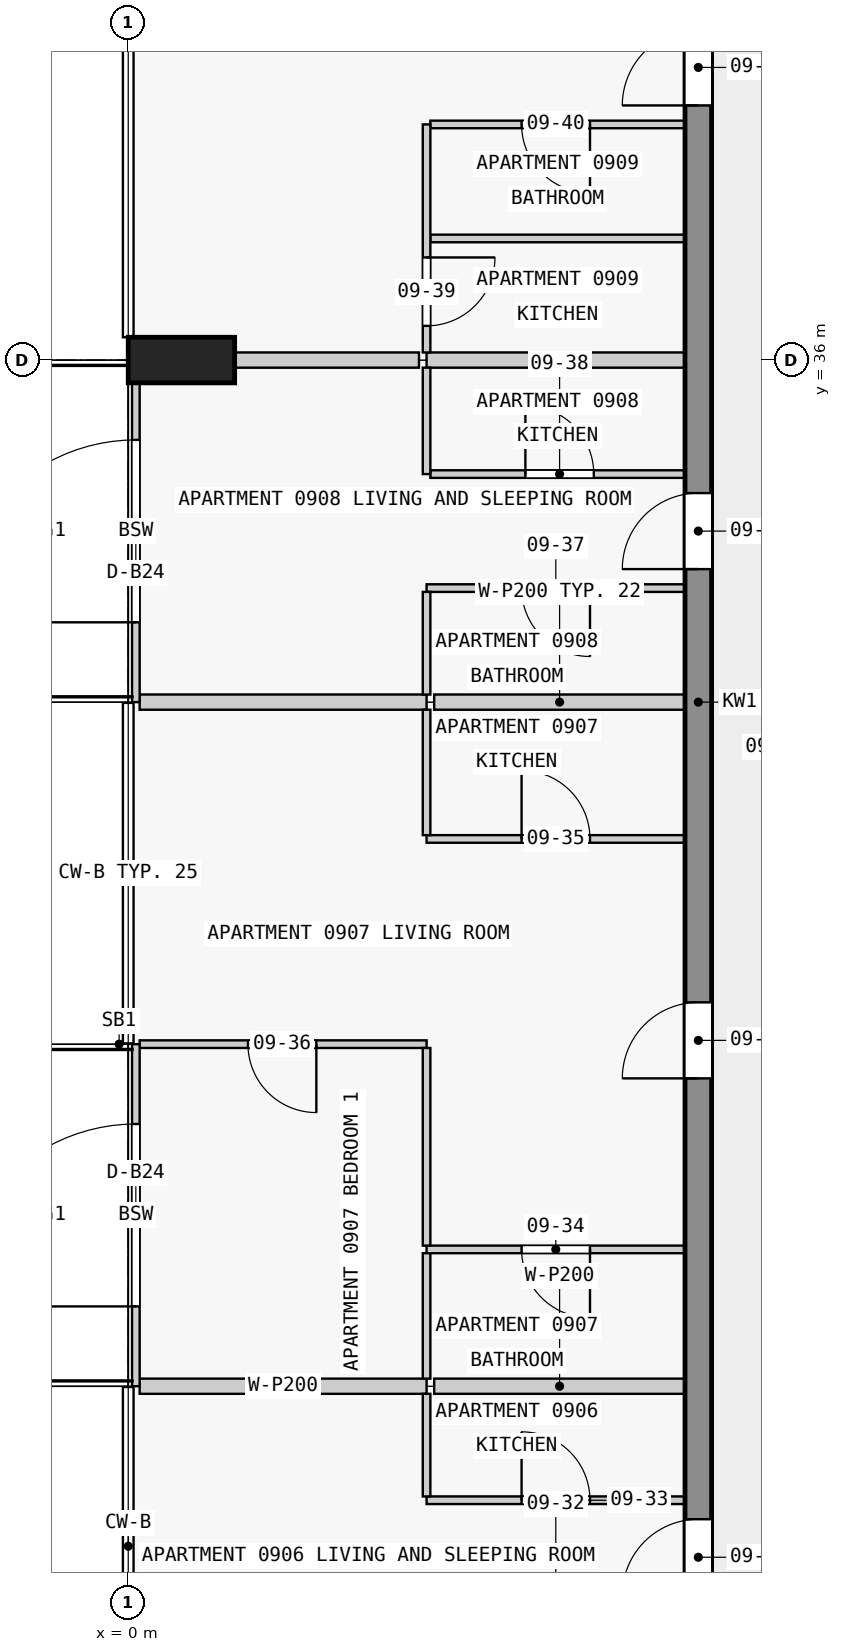
"""IFC4 building model, lengths in metres.
Left out: names, types, materials, properties, quantities, classifications, styles, units other than length and angle.
Written with IfcOpenShell. Run it as: python <this file> out.ifc"""

import sys

from ifc_helpers import new_model, si_unit, direction, frame, frame_2d, origin, origin_2d, place, context, subcontext, project, spatial, rectangle, extrude, element, fill, save


model = new_model("IFC4")
c1 = context("Model", 3, precision=1e-05, world=origin(), true_north=direction((0.0, 1.0)))
c2 = subcontext(c1, "Body", "Model", "MODEL_VIEW")
j1 = project(units=[si_unit("LENGTHUNIT", "METRE"), si_unit("PLANEANGLEUNIT", "RADIAN")], contexts=[c1])
p1 = place(None, origin())
s1 = spatial("IfcSite", under=j1, at=p1, CompositionType="ELEMENT")
p2 = place(p1, origin())
s2 = spatial("IfcBuilding", under=s1, at=p2, CompositionType="ELEMENT")
p3 = place(p2, frame((0.0, 0.0, 40.8)))
s3 = spatial("IfcBuildingStorey", under=s2, at=p3, CompositionType="ELEMENT", Elevation=40.8)
p4 = place(p3, frame((0.7, 36.0, 0.0), z_axis=(0.0, 0.0, 1.0), x_axis=(0.0, 1.0, 0.0)))
e1 = element("IfcColumn", 1, at=p4, inside=s3, PredefinedType="COLUMN", context=c2, shape_type="SweptSolid", body=[
    extrude(rectangle(XDim=0.6, YDim=1.4, at=origin_2d()), origin(), (0.0, 0.0, 1.0), 3.5),
])
p5 = place(p3, frame((7.5, 18.0, 0.0), z_axis=(0.0, 0.0, 1.0), x_axis=(0.0, 1.0, 0.0)))
e2 = element("IfcWall", 2, at=p5, inside=s3, PredefinedType="SHEAR", context=c2, shape_type="SweptSolid", body=[
    extrude(rectangle(XDim=27.0, YDim=0.35, at=frame_2d((13.5, 0.0))), origin(), (0.0, 0.0, 1.0), 3.25),
])
p6 = place(p5, frame((1.75, 0.0, 0.0)))
e3 = element("IfcOpeningElement", 3, at=p6, cuts=e2, PredefinedType="OPENING", context=c2, shape_type="SweptSolid", body=[
    extrude(rectangle(XDim=1.0, YDim=2.1, at=frame_2d((0.5, 1.05))), frame((0.0, 0.185, 0.0), z_axis=(0.0, -1.0, 0.0), x_axis=(1.0, 0.0, 0.0)), (0.0, 0.0, 1.0), 0.37),
])
p7 = place(p5, frame((8.55, 0.0, 0.0)))
e4 = element("IfcOpeningElement", 4, at=p7, cuts=e2, PredefinedType="OPENING", context=c2, shape_type="SweptSolid", body=[
    extrude(rectangle(XDim=1.0, YDim=2.1, at=frame_2d((0.5, 1.05))), frame((0.0, 0.185, 0.0), z_axis=(0.0, -1.0, 0.0), x_axis=(1.0, 0.0, 0.0)), (0.0, 0.0, 1.0), 0.37),
])
p8 = place(p5, frame((15.25, 0.0, 0.0)))
e5 = element("IfcOpeningElement", 5, at=p8, cuts=e2, PredefinedType="OPENING", context=c2, shape_type="SweptSolid", body=[
    extrude(rectangle(XDim=1.0, YDim=2.1, at=frame_2d((0.5, 1.05))), frame((0.0, 0.185, 0.0), z_axis=(0.0, -1.0, 0.0), x_axis=(1.0, 0.0, 0.0)), (0.0, 0.0, 1.0), 0.37),
])
p9 = place(p5, frame((21.35, 0.0, 0.0)))
e6 = element("IfcOpeningElement", 6, at=p9, cuts=e2, PredefinedType="OPENING", context=c2, shape_type="SweptSolid", body=[
    extrude(rectangle(XDim=1.0, YDim=2.1, at=frame_2d((0.5, 1.05))), frame((0.0, 0.185, 0.0), z_axis=(0.0, -1.0, 0.0), x_axis=(1.0, 0.0, 0.0)), (0.0, 0.0, 1.0), 0.37),
])
p10 = place(p3, frame((0.1, 22.5, 0.0), z_axis=(0.0, 0.0, 1.0), x_axis=(0.0, 1.0, 0.0)))
e7 = element("IfcWall", 7, at=p10, inside=s3, PredefinedType="STANDARD", context=c2, shape_type="SweptSolid", body=[
    extrude(rectangle(XDim=4.5, YDim=0.1, at=frame_2d((2.25, 0.0))), origin(), (0.0, 0.0, 1.0), 3.25),
])
p11 = place(p10, frame((1.05, 0.0, 0.0)))
e8 = element("IfcOpeningElement", 8, at=p11, cuts=e7, PredefinedType="OPENING", context=c2, shape_type="SweptSolid", body=[
    extrude(rectangle(XDim=2.4, YDim=2.4, at=frame_2d((1.2, 1.2))), frame((0.0, 0.06, 0.0), z_axis=(0.0, -1.0, 0.0), x_axis=(1.0, 0.0, 0.0)), (0.0, 0.0, 1.0), 0.12),
])
p12 = place(p3, frame((0.1, 31.5, 0.0), z_axis=(0.0, 0.0, 1.0), x_axis=(0.0, 1.0, 0.0)))
e9 = element("IfcWall", 9, at=p12, inside=s3, PredefinedType="STANDARD", context=c2, shape_type="SweptSolid", body=[
    extrude(rectangle(XDim=4.5, YDim=0.1, at=frame_2d((2.25, 0.0))), origin(), (0.0, 0.0, 1.0), 3.25),
])
p13 = place(p12, frame((1.05, 0.0, 0.0)))
e10 = element("IfcOpeningElement", 10, at=p13, cuts=e9, PredefinedType="OPENING", context=c2, shape_type="SweptSolid", body=[
    extrude(rectangle(XDim=2.4, YDim=2.4, at=frame_2d((1.2, 1.2))), frame((0.0, 0.06, 0.0), z_axis=(0.0, -1.0, 0.0), x_axis=(1.0, 0.0, 0.0)), (0.0, 0.0, 1.0), 0.12),
])
p14 = place(p3, frame((3.925, 21.0, 0.0), z_axis=(0.0, 0.0, 1.0), x_axis=(1.0, 0.0, 0.0)))
e11 = element("IfcWall", 11, at=p14, inside=s3, PredefinedType="PARTITIONING", context=c2, shape_type="SweptSolid", body=[
    extrude(rectangle(XDim=3.4, YDim=0.1, at=frame_2d((1.7, 0.0))), origin(), (0.0, 0.0, 1.0), 3.25),
])
p15 = place(p14, frame((1.25, 0.0, 0.0)))
e12 = element("IfcOpeningElement", 12, at=p15, cuts=e11, PredefinedType="OPENING", context=c2, shape_type="SweptSolid", body=[
    extrude(rectangle(XDim=0.9, YDim=2.1, at=frame_2d((0.45, 1.05))), frame((0.0, 0.06, 0.0), z_axis=(0.0, -1.0, 0.0), x_axis=(1.0, 0.0, 0.0)), (0.0, 0.0, 1.0), 0.12),
])
p16 = place(p3, frame((7.325, 22.5, 0.0), z_axis=(0.0, 0.0, 1.0), x_axis=(-1.0, 0.0, 0.0)))
e13 = element("IfcWall", 13, at=p16, inside=s3, PredefinedType="PARTITIONING", context=c2, shape_type="SweptSolid", body=[
    extrude(rectangle(XDim=3.3, YDim=0.2, at=frame_2d((1.65, 0.0))), origin(), (0.0, 0.0, 1.0), 3.25),
])
p17 = place(p3, frame((0.15, 22.5, 0.0), z_axis=(0.0, 0.0, 1.0), x_axis=(1.0, 0.0, 0.0)))
e14 = element("IfcWall", 14, at=p17, inside=s3, PredefinedType="PARTITIONING", context=c2, shape_type="SweptSolid", body=[
    extrude(rectangle(XDim=3.775, YDim=0.2, at=frame_2d((1.888, 0.0))), origin(), (0.0, 0.0, 1.0), 3.25),
])
p18 = place(p3, frame((7.325, 24.3, 0.0), z_axis=(0.0, 0.0, 1.0), x_axis=(-1.0, 0.0, 0.0)))
e15 = element("IfcWall", 15, at=p18, inside=s3, PredefinedType="PARTITIONING", context=c2, shape_type="SweptSolid", body=[
    extrude(rectangle(XDim=3.4, YDim=0.1, at=frame_2d((1.7, 0.0))), origin(), (0.0, 0.0, 1.0), 3.25),
])
p19 = place(p18, frame((1.25, 0.0, 0.0)))
e16 = element("IfcOpeningElement", 16, at=p19, cuts=e15, PredefinedType="OPENING", context=c2, shape_type="SweptSolid", body=[
    extrude(rectangle(XDim=0.9, YDim=2.1, at=frame_2d((0.45, 1.05))), frame((0.0, 0.06, 0.0), z_axis=(0.0, -1.0, 0.0), x_axis=(1.0, 0.0, 0.0)), (0.0, 0.0, 1.0), 0.12),
])
p20 = place(p3, frame((3.925, 27.0, 0.0), z_axis=(0.0, 0.0, 1.0), x_axis=(-1.0, 0.0, 0.0)))
e17 = element("IfcWall", 17, at=p20, inside=s3, PredefinedType="PARTITIONING", context=c2, shape_type="SweptSolid", body=[
    extrude(rectangle(XDim=3.775, YDim=0.1, at=frame_2d((1.888, 0.0))), origin(), (0.0, 0.0, 1.0), 3.25),
])
p21 = place(p20, frame((1.45, 0.0, 0.0)))
e18 = element("IfcOpeningElement", 18, at=p21, cuts=e17, PredefinedType="OPENING", context=c2, shape_type="SweptSolid", body=[
    extrude(rectangle(XDim=0.9, YDim=2.1, at=frame_2d((0.45, 1.05))), frame((0.0, 0.06, 0.0), z_axis=(0.0, -1.0, 0.0), x_axis=(1.0, 0.0, 0.0)), (0.0, 0.0, 1.0), 0.12),
])
p22 = place(p3, frame((3.925, 29.7, 0.0), z_axis=(0.0, 0.0, 1.0), x_axis=(1.0, 0.0, 0.0)))
e19 = element("IfcWall", 19, at=p22, inside=s3, PredefinedType="PARTITIONING", context=c2, shape_type="SweptSolid", body=[
    extrude(rectangle(XDim=3.4, YDim=0.1, at=frame_2d((1.7, 0.0))), origin(), (0.0, 0.0, 1.0), 3.25),
])
p23 = place(p22, frame((1.25, 0.0, 0.0)))
e20 = element("IfcOpeningElement", 20, at=p23, cuts=e19, PredefinedType="OPENING", context=c2, shape_type="SweptSolid", body=[
    extrude(rectangle(XDim=0.9, YDim=2.1, at=frame_2d((0.45, 1.05))), frame((0.0, 0.06, 0.0), z_axis=(0.0, -1.0, 0.0), x_axis=(1.0, 0.0, 0.0)), (0.0, 0.0, 1.0), 0.12),
])
p24 = place(p3, frame((7.325, 31.5, 0.0), z_axis=(0.0, 0.0, 1.0), x_axis=(-1.0, 0.0, 0.0)))
e21 = element("IfcWall", 21, at=p24, inside=s3, PredefinedType="PARTITIONING", context=c2, shape_type="SweptSolid", body=[
    extrude(rectangle(XDim=3.3, YDim=0.2, at=frame_2d((1.65, 0.0))), origin(), (0.0, 0.0, 1.0), 3.25),
])
p25 = place(p3, frame((0.15, 31.5, 0.0), z_axis=(0.0, 0.0, 1.0), x_axis=(1.0, 0.0, 0.0)))
e22 = element("IfcWall", 22, at=p25, inside=s3, PredefinedType="PARTITIONING", context=c2, shape_type="SweptSolid", body=[
    extrude(rectangle(XDim=3.775, YDim=0.2, at=frame_2d((1.888, 0.0))), origin(), (0.0, 0.0, 1.0), 3.25),
])
p26 = place(p3, frame((7.325, 33.0, 0.0), z_axis=(0.0, 0.0, 1.0), x_axis=(-1.0, 0.0, 0.0)))
e23 = element("IfcWall", 23, at=p26, inside=s3, PredefinedType="PARTITIONING", context=c2, shape_type="SweptSolid", body=[
    extrude(rectangle(XDim=3.4, YDim=0.1, at=frame_2d((1.7, 0.0))), origin(), (0.0, 0.0, 1.0), 3.25),
])
p27 = place(p26, frame((1.25, 0.0, 0.0)))
e24 = element("IfcOpeningElement", 24, at=p27, cuts=e23, PredefinedType="OPENING", context=c2, shape_type="SweptSolid", body=[
    extrude(rectangle(XDim=0.9, YDim=2.1, at=frame_2d((0.45, 1.05))), frame((0.0, 0.06, 0.0), z_axis=(0.0, -1.0, 0.0), x_axis=(1.0, 0.0, 0.0)), (0.0, 0.0, 1.0), 0.12),
])
p28 = place(p3, frame((3.975, 34.5, 0.0), z_axis=(0.0, 0.0, 1.0), x_axis=(1.0, 0.0, 0.0)))
e25 = element("IfcWall", 25, at=p28, inside=s3, PredefinedType="PARTITIONING", context=c2, shape_type="SweptSolid", body=[
    extrude(rectangle(XDim=3.35, YDim=0.1, at=frame_2d((1.675, 0.0))), origin(), (0.0, 0.0, 1.0), 3.25),
])
p29 = place(p28, frame((1.25, 0.0, 0.0)))
e26 = element("IfcOpeningElement", 26, at=p29, cuts=e25, PredefinedType="OPENING", context=c2, shape_type="SweptSolid", body=[
    extrude(rectangle(XDim=0.9, YDim=2.1, at=frame_2d((0.45, 1.05))), frame((0.0, 0.06, 0.0), z_axis=(0.0, -1.0, 0.0), x_axis=(1.0, 0.0, 0.0)), (0.0, 0.0, 1.0), 0.12),
])
p30 = place(p3, frame((7.325, 36.0, 0.0), z_axis=(0.0, 0.0, 1.0), x_axis=(-1.0, 0.0, 0.0)))
e27 = element("IfcWall", 27, at=p30, inside=s3, PredefinedType="PARTITIONING", context=c2, shape_type="SweptSolid", body=[
    extrude(rectangle(XDim=3.4, YDim=0.2, at=frame_2d((1.7, 0.0))), origin(), (0.0, 0.0, 1.0), 3.25),
])
p31 = place(p3, frame((1.4, 36.0, 0.0), z_axis=(0.0, 0.0, 1.0), x_axis=(1.0, 0.0, 0.0)))
e28 = element("IfcWall", 28, at=p31, inside=s3, PredefinedType="PARTITIONING", context=c2, shape_type="SweptSolid", body=[
    extrude(rectangle(XDim=2.425, YDim=0.2, at=frame_2d((1.212, 0.0))), origin(), (0.0, 0.0, 1.0), 3.25),
])
p32 = place(p3, frame((7.325, 37.6, 0.0), z_axis=(0.0, 0.0, 1.0), x_axis=(-1.0, 0.0, 0.0)))
e29 = element("IfcWall", 29, at=p32, inside=s3, PredefinedType="PARTITIONING", context=c2, shape_type="SweptSolid", body=[
    extrude(rectangle(XDim=3.35, YDim=0.1, at=frame_2d((1.675, 0.0))), origin(), (0.0, 0.0, 1.0), 3.25),
])
p33 = place(p3, frame((7.325, 39.1, 0.0), z_axis=(0.0, 0.0, 1.0), x_axis=(-1.0, 0.0, 0.0)))
e30 = element("IfcWall", 30, at=p33, inside=s3, PredefinedType="PARTITIONING", context=c2, shape_type="SweptSolid", body=[
    extrude(rectangle(XDim=3.35, YDim=0.1, at=frame_2d((1.675, 0.0))), origin(), (0.0, 0.0, 1.0), 3.25),
])
p34 = place(p33, frame((1.25, 0.0, 0.0)))
e31 = element("IfcOpeningElement", 31, at=p34, cuts=e30, PredefinedType="OPENING", context=c2, shape_type="SweptSolid", body=[
    extrude(rectangle(XDim=0.9, YDim=2.1, at=frame_2d((0.45, 1.05))), frame((0.0, 0.06, 0.0), z_axis=(0.0, -1.0, 0.0), x_axis=(1.0, 0.0, 0.0)), (0.0, 0.0, 1.0), 0.12),
])
p35 = place(p3, frame((3.925, 22.4, 0.0), z_axis=(0.0, 0.0, 1.0), x_axis=(0.0, -1.0, 0.0)))
e32 = element("IfcWall", 32, at=p35, inside=s3, PredefinedType="PARTITIONING", context=c2, shape_type="SweptSolid", body=[
    extrude(rectangle(XDim=1.35, YDim=0.1, at=frame_2d((0.675, 0.0))), origin(), (0.0, 0.0, 1.0), 3.25),
])
for number, where, z_axis, x_axis in (
    (33, (3.925, 24.25, 0.0), (0.0, 0.0, 1.0), (0.0, -1.0, 0.0)),
    (34, (3.925, 31.4, 0.0), (0.0, 0.0, 1.0), (0.0, -1.0, 0.0)),
):
    element("IfcWall", number, at=place(p3, frame(where, z_axis=z_axis, x_axis=x_axis)), inside=s3, PredefinedType="PARTITIONING", context=c2, shape_type="SweptSolid", body=[
        extrude(rectangle(XDim=1.65, YDim=0.1, at=frame_2d((0.825, 0.0))), origin(), (0.0, 0.0, 1.0), 3.25),
    ])
p36 = place(p3, frame((3.925, 32.95, 0.0), z_axis=(0.0, 0.0, 1.0), x_axis=(0.0, -1.0, 0.0)))
e35 = element("IfcWall", 35, at=p36, inside=s3, PredefinedType="PARTITIONING", context=c2, shape_type="SweptSolid", body=[
    extrude(rectangle(XDim=1.35, YDim=0.1, at=frame_2d((0.675, 0.0))), origin(), (0.0, 0.0, 1.0), 3.25),
])
p37 = place(p3, frame((3.925, 35.9, 0.0), z_axis=(0.0, 0.0, 1.0), x_axis=(0.0, -1.0, 0.0)))
e36 = element("IfcWall", 36, at=p37, inside=s3, PredefinedType="PARTITIONING", context=c2, shape_type="SweptSolid", body=[
    extrude(rectangle(XDim=1.4, YDim=0.1, at=frame_2d((0.7, 0.0))), origin(), (0.0, 0.0, 1.0), 3.25),
])
p38 = place(p3, frame((3.925, 39.1, 0.0), z_axis=(0.0, 0.0, 1.0), x_axis=(0.0, -1.0, 0.0)))
e37 = element("IfcWall", 37, at=p38, inside=s3, PredefinedType="PARTITIONING", context=c2, shape_type="SweptSolid", body=[
    extrude(rectangle(XDim=3.0, YDim=0.1, at=frame_2d((1.5, 0.0))), origin(), (0.0, 0.0, 1.0), 3.25),
])
p39 = place(p38, frame((1.75, 0.0, 0.0)))
e38 = element("IfcOpeningElement", 38, at=p39, cuts=e37, PredefinedType="OPENING", context=c2, shape_type="SweptSolid", body=[
    extrude(rectangle(XDim=0.9, YDim=2.1, at=frame_2d((0.45, 1.05))), frame((0.0, 0.06, 0.0), z_axis=(0.0, -1.0, 0.0), x_axis=(1.0, 0.0, 0.0)), (0.0, 0.0, 1.0), 0.12),
])
p40 = place(p3, frame((3.925, 24.35, 0.0), z_axis=(0.0, 0.0, 1.0), x_axis=(0.0, 1.0, 0.0)))
e39 = element("IfcWall", 39, at=p40, inside=s3, PredefinedType="PARTITIONING", context=c2, shape_type="SweptSolid", body=[
    extrude(rectangle(XDim=2.6, YDim=0.1, at=frame_2d((1.3, 0.0))), origin(), (0.0, 0.0, 1.0), 3.25),
])
p41 = place(p11, origin())
e40 = element("IfcDoor", 40, at=p41, inside=s3, OperationType="SINGLE_SWING_LEFT", PredefinedType="DOOR", context=c2, shape_type="SweptSolid", body=[
    extrude(rectangle(XDim=2.4, YDim=2.4, at=frame_2d((1.2, 1.2))), frame((0.0, 0.025, 0.0), z_axis=(0.0, -1.0, 0.0), x_axis=(1.0, 0.0, 0.0)), (0.0, 0.0, 1.0), 0.05),
])
fill(e8, e40)
p42 = place(p13, origin())
e41 = element("IfcDoor", 41, at=p42, inside=s3, OperationType="SINGLE_SWING_LEFT", PredefinedType="DOOR", context=c2, shape_type="SweptSolid", body=[
    extrude(rectangle(XDim=2.4, YDim=2.4, at=frame_2d((1.2, 1.2))), frame((0.0, 0.025, 0.0), z_axis=(0.0, -1.0, 0.0), x_axis=(1.0, 0.0, 0.0)), (0.0, 0.0, 1.0), 0.05),
])
fill(e10, e41)
p43 = place(p6, origin())
e42 = element("IfcDoor", 42, at=p43, inside=s3, OperationType="SINGLE_SWING_LEFT", PredefinedType="DOOR", context=c2, shape_type="SweptSolid", body=[
    extrude(rectangle(XDim=1.0, YDim=2.1, at=frame_2d((0.5, 1.05))), frame((0.0, 0.025, 0.0), z_axis=(0.0, -1.0, 0.0), x_axis=(1.0, 0.0, 0.0)), (0.0, 0.0, 1.0), 0.05),
])
fill(e3, e42)
p44 = place(p7, origin())
e43 = element("IfcDoor", 43, at=p44, inside=s3, OperationType="SINGLE_SWING_LEFT", PredefinedType="DOOR", context=c2, shape_type="SweptSolid", body=[
    extrude(rectangle(XDim=1.0, YDim=2.1, at=frame_2d((0.5, 1.05))), frame((0.0, 0.025, 0.0), z_axis=(0.0, -1.0, 0.0), x_axis=(1.0, 0.0, 0.0)), (0.0, 0.0, 1.0), 0.05),
])
fill(e4, e43)
p45 = place(p8, origin())
e44 = element("IfcDoor", 44, at=p45, inside=s3, OperationType="SINGLE_SWING_RIGHT", PredefinedType="DOOR", context=c2, shape_type="SweptSolid", body=[
    extrude(rectangle(XDim=1.0, YDim=2.1, at=frame_2d((0.5, 1.05))), frame((0.0, 0.025, 0.0), z_axis=(0.0, -1.0, 0.0), x_axis=(1.0, 0.0, 0.0)), (0.0, 0.0, 1.0), 0.05),
])
fill(e5, e44)
p46 = place(p9, origin())
e45 = element("IfcDoor", 45, at=p46, inside=s3, OperationType="SINGLE_SWING_RIGHT", PredefinedType="DOOR", context=c2, shape_type="SweptSolid", body=[
    extrude(rectangle(XDim=1.0, YDim=2.1, at=frame_2d((0.5, 1.05))), frame((0.0, 0.025, 0.0), z_axis=(0.0, -1.0, 0.0), x_axis=(1.0, 0.0, 0.0)), (0.0, 0.0, 1.0), 0.05),
])
fill(e6, e45)
p47 = place(p15, origin())
e46 = element("IfcDoor", 46, at=p47, inside=s3, OperationType="SINGLE_SWING_LEFT", PredefinedType="DOOR", context=c2, shape_type="SweptSolid", body=[
    extrude(rectangle(XDim=0.9, YDim=2.1, at=frame_2d((0.45, 1.05))), frame((0.0, 0.025, 0.0), z_axis=(0.0, -1.0, 0.0), x_axis=(1.0, 0.0, 0.0)), (0.0, 0.0, 1.0), 0.05),
])
fill(e12, e46)
p48 = place(p19, origin())
e47 = element("IfcDoor", 47, at=p48, inside=s3, OperationType="SINGLE_SWING_LEFT", PredefinedType="DOOR", context=c2, shape_type="SweptSolid", body=[
    extrude(rectangle(XDim=0.9, YDim=2.1, at=frame_2d((0.45, 1.05))), frame((0.0, 0.025, 0.0), z_axis=(0.0, -1.0, 0.0), x_axis=(1.0, 0.0, 0.0)), (0.0, 0.0, 1.0), 0.05),
])
fill(e16, e47)
p49 = place(p23, origin())
e48 = element("IfcDoor", 48, at=p49, inside=s3, OperationType="SINGLE_SWING_LEFT", PredefinedType="DOOR", context=c2, shape_type="SweptSolid", body=[
    extrude(rectangle(XDim=0.9, YDim=2.1, at=frame_2d((0.45, 1.05))), frame((0.0, 0.025, 0.0), z_axis=(0.0, -1.0, 0.0), x_axis=(1.0, 0.0, 0.0)), (0.0, 0.0, 1.0), 0.05),
])
fill(e20, e48)
p50 = place(p21, origin())
e49 = element("IfcDoor", 49, at=p50, inside=s3, OperationType="SINGLE_SWING_RIGHT", PredefinedType="DOOR", context=c2, shape_type="SweptSolid", body=[
    extrude(rectangle(XDim=0.9, YDim=2.1, at=frame_2d((0.45, 1.05))), frame((0.0, 0.025, 0.0), z_axis=(0.0, -1.0, 0.0), x_axis=(1.0, 0.0, 0.0)), (0.0, 0.0, 1.0), 0.05),
])
fill(e18, e49)
p51 = place(p27, origin())
e50 = element("IfcDoor", 50, at=p51, inside=s3, OperationType="SINGLE_SWING_LEFT", PredefinedType="DOOR", context=c2, shape_type="SweptSolid", body=[
    extrude(rectangle(XDim=0.9, YDim=2.1, at=frame_2d((0.45, 1.05))), frame((0.0, 0.025, 0.0), z_axis=(0.0, -1.0, 0.0), x_axis=(1.0, 0.0, 0.0)), (0.0, 0.0, 1.0), 0.05),
])
fill(e24, e50)
p52 = place(p29, origin())
e51 = element("IfcDoor", 51, at=p52, inside=s3, OperationType="SINGLE_SWING_RIGHT", PredefinedType="DOOR", context=c2, shape_type="SweptSolid", body=[
    extrude(rectangle(XDim=0.9, YDim=2.1, at=frame_2d((0.45, 1.05))), frame((0.0, 0.025, 0.0), z_axis=(0.0, -1.0, 0.0), x_axis=(1.0, 0.0, 0.0)), (0.0, 0.0, 1.0), 0.05),
])
fill(e26, e51)
p53 = place(p39, origin())
e52 = element("IfcDoor", 52, at=p53, inside=s3, OperationType="SINGLE_SWING_RIGHT", PredefinedType="DOOR", context=c2, shape_type="SweptSolid", body=[
    extrude(rectangle(XDim=0.9, YDim=2.1, at=frame_2d((0.45, 1.05))), frame((0.0, 0.025, 0.0), z_axis=(0.0, -1.0, 0.0), x_axis=(1.0, 0.0, 0.0)), (0.0, 0.0, 1.0), 0.05),
])
fill(e38, e52)
p54 = place(p34, origin())
e53 = element("IfcDoor", 53, at=p54, inside=s3, OperationType="SINGLE_SWING_RIGHT", PredefinedType="DOOR", context=c2, shape_type="SweptSolid", body=[
    extrude(rectangle(XDim=0.9, YDim=2.1, at=frame_2d((0.45, 1.05))), frame((0.0, 0.025, 0.0), z_axis=(0.0, -1.0, 0.0), x_axis=(1.0, 0.0, 0.0)), (0.0, 0.0, 1.0), 0.05),
])
fill(e31, e53)
save(model, sys.argv[1])
